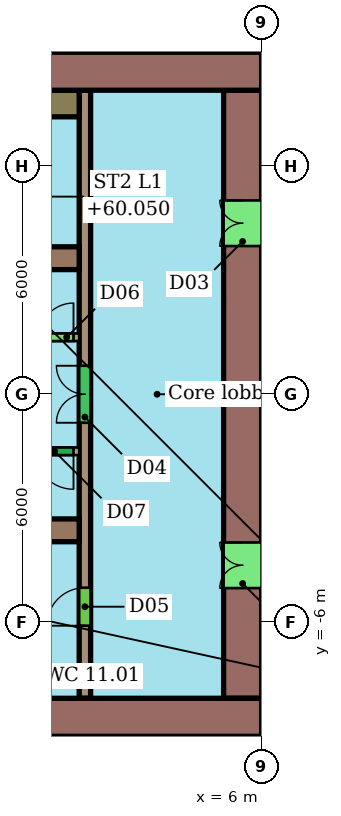
"""IFC4 building model, lengths in metres.
Left out: names, types, materials, properties, quantities, classifications, styles, units other than length and angle.
Written with IfcOpenShell. Run it as: python <this file> out.ifc"""

import sys

from ifc_helpers import new_model, si_unit, direction, frame, frame_2d, origin, place, context, subcontext, project, spatial, rectangle, extrude, element, fill, save


model = new_model("IFC4")
c1 = context("Model", 3, precision=1e-05, world=origin(), true_north=direction((0.0, 1.0)))
c2 = subcontext(c1, "Body", "Model", "MODEL_VIEW")
j1 = project(units=[si_unit("LENGTHUNIT", "METRE"), si_unit("PLANEANGLEUNIT", "RADIAN")], contexts=[c1])
p1 = place(None, origin())
s1 = spatial("IfcSite", under=j1, at=p1, CompositionType="ELEMENT")
p2 = place(p1, origin())
s2 = spatial("IfcBuilding", under=s1, at=p2, CompositionType="ELEMENT")
p3 = place(p2, frame((0.0, 0.0, 58.2)))
s3 = spatial("IfcBuildingStorey", under=s2, at=p3, CompositionType="ELEMENT", Elevation=58.2)
p4 = place(p3, frame((6.0, 8.5, 0.0), z_axis=(0.0, 0.0, 1.0), x_axis=(-1.0, 0.0, 0.0)))
e1 = element("IfcWall", 1, at=p4, inside=s3, PredefinedType="SHEAR", context=c2, shape_type="SweptSolid", body=[
    extrude(rectangle(XDim=12.0, YDim=1.0, at=frame_2d((6.0, 0.0))), origin(), (0.0, 0.0, 1.0), 3.4),
])
p5 = place(p4, frame((5.6, 0.0, 0.0)))
e2 = element("IfcOpeningElement", 2, at=p5, cuts=e1, PredefinedType="OPENING", context=c2, shape_type="SweptSolid", body=[
    extrude(rectangle(XDim=1.2, YDim=2.1, at=frame_2d((0.6, 1.05))), frame((0.0, 0.51, 0.0), z_axis=(0.0, -1.0, 0.0), x_axis=(1.0, 0.0, 0.0)), (0.0, 0.0, 1.0), 1.02),
])
p6 = place(p3, frame((-18.0, -8.5, 0.0), z_axis=(0.0, 0.0, 1.0), x_axis=(1.0, 0.0, 0.0)))
e3 = element("IfcWall", 3, at=p6, inside=s3, PredefinedType="SHEAR", context=c2, shape_type="SweptSolid", body=[
    extrude(rectangle(XDim=24.0, YDim=1.0, at=frame_2d((12.0, 0.0))), origin(), (0.0, 0.0, 1.0), 3.4),
])
p7 = place(p6, frame((6.0, 0.0, 0.0)))
e4 = element("IfcOpeningElement", 4, at=p7, cuts=e3, PredefinedType="OPENING", context=c2, shape_type="SweptSolid", body=[
    extrude(rectangle(XDim=1.2, YDim=2.1, at=frame_2d((0.6, 1.05))), frame((0.0, 0.51, 0.0), z_axis=(0.0, -1.0, 0.0), x_axis=(1.0, 0.0, 0.0)), (0.0, 0.0, 1.0), 1.02),
])
p8 = place(p3, frame((5.5, -8.0, 0.0), z_axis=(0.0, 0.0, 1.0), x_axis=(0.0, 1.0, 0.0)))
e5 = element("IfcWall", 5, at=p8, inside=s3, PredefinedType="SHEAR", context=c2, shape_type="SweptSolid", body=[
    extrude(rectangle(XDim=16.0, YDim=1.0, at=frame_2d((8.0, 0.0))), origin(), (0.0, 0.0, 1.0), 3.4),
])
p9 = place(p8, frame((2.9, 0.0, 0.0)))
e6 = element("IfcOpeningElement", 6, at=p9, cuts=e5, PredefinedType="OPENING", context=c2, shape_type="SweptSolid", body=[
    extrude(rectangle(XDim=1.2, YDim=2.1, at=frame_2d((0.6, 1.05))), frame((0.0, 0.51, 0.0), z_axis=(0.0, -1.0, 0.0), x_axis=(1.0, 0.0, 0.0)), (0.0, 0.0, 1.0), 1.02),
])
p10 = place(p8, frame((11.9, 0.0, 0.0)))
e7 = element("IfcOpeningElement", 7, at=p10, cuts=e5, PredefinedType="OPENING", context=c2, shape_type="SweptSolid", body=[
    extrude(rectangle(XDim=1.2, YDim=2.1, at=frame_2d((0.6, 1.05))), frame((0.0, 0.51, 0.0), z_axis=(0.0, -1.0, 0.0), x_axis=(1.0, 0.0, 0.0)), (0.0, 0.0, 1.0), 1.02),
])
for number, where, z_axis, x_axis in (
    (8, (-6.0, 3.58, 0.0), (0.0, 0.0, 1.0), (1.0, 0.0, 0.0)),
    (9, (-6.0, -3.58, 0.0), (0.0, 0.0, 1.0), (1.0, 0.0, 0.0)),
):
    element("IfcWall", number, at=place(p3, frame(where, z_axis=z_axis, x_axis=x_axis)), inside=s3, PredefinedType="SHEAR", context=c2, shape_type="SweptSolid", body=[
        extrude(rectangle(XDim=7.2, YDim=0.6, at=frame_2d((3.6, 0.0))), origin(), (0.0, 0.0, 1.0), 3.4),
    ])
p11 = place(p3, frame((1.35, -8.0, 0.0), z_axis=(0.0, 0.0, 1.0), x_axis=(0.0, 1.0, 0.0)))
e10 = element("IfcWall", 10, at=p11, inside=s3, PredefinedType="SHEAR", context=c2, shape_type="SweptSolid", body=[
    extrude(rectangle(XDim=16.0, YDim=0.3, at=frame_2d((8.0, 0.0))), origin(), (0.0, 0.0, 1.0), 3.4),
])
p12 = place(p11, frame((1.91, 0.0, 0.0)))
e11 = element("IfcOpeningElement", 11, at=p12, cuts=e10, PredefinedType="OPENING", context=c2, shape_type="SweptSolid", body=[
    extrude(rectangle(XDim=1.0, YDim=2.1, at=frame_2d((0.5, 1.05))), frame((0.0, 0.16, 0.0), z_axis=(0.0, -1.0, 0.0), x_axis=(1.0, 0.0, 0.0)), (0.0, 0.0, 1.0), 0.32),
])
p13 = place(p11, frame((7.25, 0.0, 0.0)))
e12 = element("IfcOpeningElement", 12, at=p13, cuts=e10, PredefinedType="OPENING", context=c2, shape_type="SweptSolid", body=[
    extrude(rectangle(XDim=1.5, YDim=2.1, at=frame_2d((0.75, 1.05))), frame((0.0, 0.16, 0.0), z_axis=(0.0, -1.0, 0.0), x_axis=(1.0, 0.0, 0.0)), (0.0, 0.0, 1.0), 0.32),
])
p14 = place(p3, frame((-13.2, 1.5, 0.0), z_axis=(0.0, 0.0, 1.0), x_axis=(1.0, 0.0, 0.0)))
e13 = element("IfcWall", 13, at=p14, inside=s3, PredefinedType="SHEAR", context=c2, shape_type="SweptSolid", body=[
    extrude(rectangle(XDim=14.4, YDim=0.2, at=frame_2d((7.2, 0.0))), origin(), (0.0, 0.0, 1.0), 3.4),
])
p15 = place(p14, frame((0.546, 0.0, 0.0)))
e14 = element("IfcOpeningElement", 14, at=p15, cuts=e13, PredefinedType="OPENING", context=c2, shape_type="SweptSolid", body=[
    extrude(rectangle(XDim=1.1, YDim=2.1, at=frame_2d((0.55, 1.05))), frame((0.0, 0.11, 0.0), z_axis=(0.0, -1.0, 0.0), x_axis=(1.0, 0.0, 0.0)), (0.0, 0.0, 1.0), 0.22),
])
p16 = place(p14, frame((2.988, 0.0, 0.0)))
e15 = element("IfcOpeningElement", 15, at=p16, cuts=e13, PredefinedType="OPENING", context=c2, shape_type="SweptSolid", body=[
    extrude(rectangle(XDim=1.1, YDim=2.1, at=frame_2d((0.55, 1.05))), frame((0.0, 0.11, 0.0), z_axis=(0.0, -1.0, 0.0), x_axis=(1.0, 0.0, 0.0)), (0.0, 0.0, 1.0), 0.22),
])
p17 = place(p14, frame((5.429, 0.0, 0.0)))
e16 = element("IfcOpeningElement", 16, at=p17, cuts=e13, PredefinedType="OPENING", context=c2, shape_type="SweptSolid", body=[
    extrude(rectangle(XDim=1.1, YDim=2.1, at=frame_2d((0.55, 1.05))), frame((0.0, 0.11, 0.0), z_axis=(0.0, -1.0, 0.0), x_axis=(1.0, 0.0, 0.0)), (0.0, 0.0, 1.0), 0.22),
])
p18 = place(p14, frame((7.871, 0.0, 0.0)))
e17 = element("IfcOpeningElement", 17, at=p18, cuts=e13, PredefinedType="OPENING", context=c2, shape_type="SweptSolid", body=[
    extrude(rectangle(XDim=1.1, YDim=2.1, at=frame_2d((0.55, 1.05))), frame((0.0, 0.11, 0.0), z_axis=(0.0, -1.0, 0.0), x_axis=(1.0, 0.0, 0.0)), (0.0, 0.0, 1.0), 0.22),
])
p19 = place(p14, frame((10.958, 0.0, 0.0)))
e18 = element("IfcOpeningElement", 18, at=p19, cuts=e13, PredefinedType="OPENING", context=c2, shape_type="SweptSolid", body=[
    extrude(rectangle(XDim=0.9, YDim=2.1, at=frame_2d((0.45, 1.05))), frame((0.0, 0.11, 0.0), z_axis=(0.0, -1.0, 0.0), x_axis=(1.0, 0.0, 0.0)), (0.0, 0.0, 1.0), 0.22),
])
p20 = place(p14, frame((13.35, 0.0, 0.0)))
e19 = element("IfcOpeningElement", 19, at=p20, cuts=e13, PredefinedType="OPENING", context=c2, shape_type="SweptSolid", body=[
    extrude(rectangle(XDim=0.9, YDim=2.1, at=frame_2d((0.45, 1.05))), frame((0.0, 0.11, 0.0), z_axis=(0.0, -1.0, 0.0), x_axis=(1.0, 0.0, 0.0)), (0.0, 0.0, 1.0), 0.22),
])
p21 = place(p3, frame((1.2, -1.5, 0.0), z_axis=(0.0, 0.0, 1.0), x_axis=(-1.0, 0.0, 0.0)))
e20 = element("IfcWall", 20, at=p21, inside=s3, PredefinedType="SHEAR", context=c2, shape_type="SweptSolid", body=[
    extrude(rectangle(XDim=14.4, YDim=0.2, at=frame_2d((7.2, 0.0))), origin(), (0.0, 0.0, 1.0), 3.4),
])
p22 = place(p21, frame((7.821, 0.0, 0.0)))
e21 = element("IfcOpeningElement", 21, at=p22, cuts=e20, PredefinedType="OPENING", context=c2, shape_type="SweptSolid", body=[
    extrude(rectangle(XDim=1.2, YDim=2.1, at=frame_2d((0.6, 1.05))), frame((0.0, 0.11, 0.0), z_axis=(0.0, -1.0, 0.0), x_axis=(1.0, 0.0, 0.0)), (0.0, 0.0, 1.0), 0.22),
])
p23 = place(p21, frame((0.15, 0.0, 0.0)))
e22 = element("IfcOpeningElement", 22, at=p23, cuts=e20, PredefinedType="OPENING", context=c2, shape_type="SweptSolid", body=[
    extrude(rectangle(XDim=1.0, YDim=2.1, at=frame_2d((0.5, 1.05))), frame((0.0, 0.11, 0.0), z_axis=(0.0, -1.0, 0.0), x_axis=(1.0, 0.0, 0.0)), (0.0, 0.0, 1.0), 0.22),
])
p24 = place(p3, frame((0.4, 7.65, 0.0), z_axis=(0.0, 0.0, 1.0), x_axis=(1.0, 0.0, 0.0)))
e23 = element("IfcWall", 23, at=p24, inside=s3, PredefinedType="SHEAR", context=c2, shape_type="SweptSolid", body=[
    extrude(rectangle(XDim=0.8, YDim=0.7, at=frame_2d((0.4, 0.0))), origin(), (0.0, 0.0, 1.0), 3.4),
])
p25 = place(p9, origin())
e24 = element("IfcDoor", 24, at=p25, inside=s3, OperationType="DOUBLE_DOOR_SINGLE_SWING", PredefinedType="NOTDEFINED", context=c2, shape_type="SweptSolid", body=[
    extrude(rectangle(XDim=1.2, YDim=2.1, at=frame_2d((0.6, 1.05))), frame((0.0, 0.025, 0.0), z_axis=(0.0, -1.0, 0.0), x_axis=(1.0, 0.0, 0.0)), (0.0, 0.0, 1.0), 0.05),
])
fill(e6, e24)
p26 = place(p10, origin())
e25 = element("IfcDoor", 25, at=p26, inside=s3, OperationType="DOUBLE_DOOR_SINGLE_SWING", PredefinedType="NOTDEFINED", context=c2, shape_type="SweptSolid", body=[
    extrude(rectangle(XDim=1.2, YDim=2.1, at=frame_2d((0.6, 1.05))), frame((0.0, 0.025, 0.0), z_axis=(0.0, -1.0, 0.0), x_axis=(1.0, 0.0, 0.0)), (0.0, 0.0, 1.0), 0.05),
])
fill(e7, e25)
p27 = place(p12, origin())
e26 = element("IfcDoor", 26, at=p27, inside=s3, OperationType="SINGLE_SWING_LEFT", PredefinedType="NOTDEFINED", context=c2, shape_type="SweptSolid", body=[
    extrude(rectangle(XDim=1.0, YDim=2.1, at=frame_2d((0.5, 1.05))), frame((0.0, 0.025, 0.0), z_axis=(0.0, -1.0, 0.0), x_axis=(1.0, 0.0, 0.0)), (0.0, 0.0, 1.0), 0.05),
])
fill(e11, e26)
p28 = place(p13, origin())
e27 = element("IfcDoor", 27, at=p28, inside=s3, OperationType="DOUBLE_DOOR_SINGLE_SWING", PredefinedType="NOTDEFINED", context=c2, shape_type="SweptSolid", body=[
    extrude(rectangle(XDim=1.5, YDim=2.1, at=frame_2d((0.75, 1.05))), frame((0.0, 0.025, 0.0), z_axis=(0.0, -1.0, 0.0), x_axis=(1.0, 0.0, 0.0)), (0.0, 0.0, 1.0), 0.05),
])
fill(e12, e27)
p29 = place(p20, origin())
e28 = element("IfcDoor", 28, at=p29, inside=s3, OperationType="SINGLE_SWING_RIGHT", PredefinedType="NOTDEFINED", context=c2, shape_type="SweptSolid", body=[
    extrude(rectangle(XDim=0.9, YDim=2.1, at=frame_2d((0.45, 1.05))), frame((0.0, 0.025, 0.0), z_axis=(0.0, -1.0, 0.0), x_axis=(1.0, 0.0, 0.0)), (0.0, 0.0, 1.0), 0.05),
])
fill(e19, e28)
p30 = place(p23, origin())
e29 = element("IfcDoor", 29, at=p30, inside=s3, OperationType="SINGLE_SWING_LEFT", PredefinedType="NOTDEFINED", context=c2, shape_type="SweptSolid", body=[
    extrude(rectangle(XDim=1.0, YDim=2.1, at=frame_2d((0.5, 1.05))), frame((0.0, 0.025, 0.0), z_axis=(0.0, -1.0, 0.0), x_axis=(1.0, 0.0, 0.0)), (0.0, 0.0, 1.0), 0.05),
])
fill(e22, e29)
save(model, sys.argv[1])
